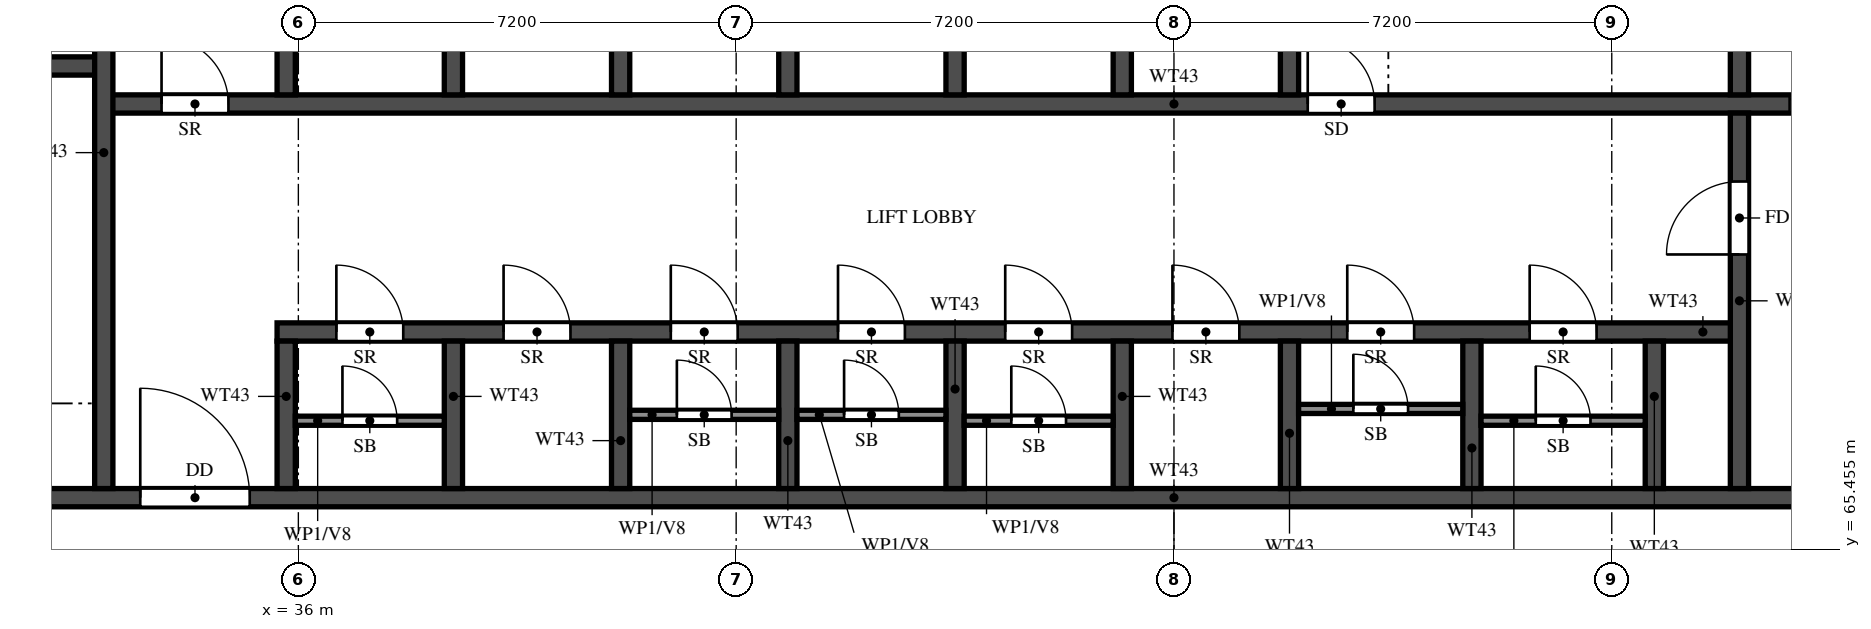
"""IFC4 building model, lengths in metres.
Left out: names, types, materials, properties, quantities, classifications, styles, units other than length and angle.
Written with IfcOpenShell. Run it as: python <this file> out.ifc"""

import sys

from ifc_helpers import new_model, si_unit, direction, frame, frame_2d, origin, place, context, subcontext, project, spatial, rectangle, extrude, element, fill, save


model = new_model("IFC4")
c1 = context("Model", 3, precision=1e-05, world=origin(), true_north=direction((0.0, 1.0)))
c2 = subcontext(c1, "Body", "Model", "MODEL_VIEW")
j1 = project(units=[si_unit("LENGTHUNIT", "METRE"), si_unit("PLANEANGLEUNIT", "RADIAN")], contexts=[c1])
p1 = place(None, origin())
s1 = spatial("IfcSite", under=j1, at=p1, CompositionType="ELEMENT")
p2 = place(p1, origin())
s2 = spatial("IfcBuilding", under=s1, at=p2, CompositionType="ELEMENT")
p3 = place(p2, frame((0.0, 0.0, 274.5)))
s3 = spatial("IfcBuildingStorey", under=s2, at=p3, CompositionType="ELEMENT", Elevation=274.5)
p4 = place(p3, frame((29.2, 66.3, 0.0), z_axis=(0.0, 0.0, 1.0), x_axis=(1.0, 0.0, 0.0)))
e1 = element("IfcWall", 1, at=p4, inside=s3, PredefinedType="SHEAR", context=c2, shape_type="SweptSolid", body=[
    extrude(rectangle(XDim=42.4, YDim=0.3, at=frame_2d((21.2, 0.0))), origin(), (0.0, 0.0, 1.0), 7.0),
])
p5 = place(p4, frame((1.425, 0.0, 0.0)))
e2 = element("IfcOpeningElement", 2, at=p5, cuts=e1, PredefinedType="OPENING", context=c2, shape_type="SweptSolid", body=[
    extrude(rectangle(XDim=1.1, YDim=2.1, at=frame_2d((0.55, 1.05))), frame((0.0, 0.16, 0.0), z_axis=(0.0, -1.0, 0.0), x_axis=(1.0, 0.0, 0.0)), (0.0, 0.0, 1.0), 0.32),
])
p6 = place(p4, frame((4.2, 0.0, 0.0)))
e3 = element("IfcOpeningElement", 3, at=p6, cuts=e1, PredefinedType="OPENING", context=c2, shape_type="SweptSolid", body=[
    extrude(rectangle(XDim=1.8, YDim=2.1, at=frame_2d((0.9, 1.05))), frame((0.0, 0.16, 0.0), z_axis=(0.0, -1.0, 0.0), x_axis=(1.0, 0.0, 0.0)), (0.0, 0.0, 1.0), 0.32),
])
p7 = place(p3, frame((35.65, 69.025, 0.0), z_axis=(0.0, 0.0, 1.0), x_axis=(1.0, 0.0, 0.0)))
e4 = element("IfcWall", 4, at=p7, inside=s3, PredefinedType="SHEAR", context=c2, shape_type="SweptSolid", body=[
    extrude(rectangle(XDim=24.05, YDim=0.3, at=frame_2d((12.025, 0.0))), origin(), (0.0, 0.0, 1.0), 7.0),
])
p8 = place(p7, frame((0.975, 0.0, 0.0)))
e5 = element("IfcOpeningElement", 5, at=p8, cuts=e4, PredefinedType="OPENING", context=c2, shape_type="SweptSolid", body=[
    extrude(rectangle(XDim=1.1, YDim=2.1, at=frame_2d((0.55, 1.05))), frame((0.0, 0.16, 0.0), z_axis=(0.0, -1.0, 0.0), x_axis=(1.0, 0.0, 0.0)), (0.0, 0.0, 1.0), 0.32),
])
p9 = place(p7, frame((3.725, 0.0, 0.0)))
e6 = element("IfcOpeningElement", 6, at=p9, cuts=e4, PredefinedType="OPENING", context=c2, shape_type="SweptSolid", body=[
    extrude(rectangle(XDim=1.1, YDim=2.1, at=frame_2d((0.55, 1.05))), frame((0.0, 0.16, 0.0), z_axis=(0.0, -1.0, 0.0), x_axis=(1.0, 0.0, 0.0)), (0.0, 0.0, 1.0), 0.32),
])
p10 = place(p7, frame((6.475, 0.0, 0.0)))
e7 = element("IfcOpeningElement", 7, at=p10, cuts=e4, PredefinedType="OPENING", context=c2, shape_type="SweptSolid", body=[
    extrude(rectangle(XDim=1.1, YDim=2.1, at=frame_2d((0.55, 1.05))), frame((0.0, 0.16, 0.0), z_axis=(0.0, -1.0, 0.0), x_axis=(1.0, 0.0, 0.0)), (0.0, 0.0, 1.0), 0.32),
])
p11 = place(p7, frame((9.225, 0.0, 0.0)))
e8 = element("IfcOpeningElement", 8, at=p11, cuts=e4, PredefinedType="OPENING", context=c2, shape_type="SweptSolid", body=[
    extrude(rectangle(XDim=1.1, YDim=2.1, at=frame_2d((0.55, 1.05))), frame((0.0, 0.16, 0.0), z_axis=(0.0, -1.0, 0.0), x_axis=(1.0, 0.0, 0.0)), (0.0, 0.0, 1.0), 0.32),
])
p12 = place(p7, frame((11.975, 0.0, 0.0)))
e9 = element("IfcOpeningElement", 9, at=p12, cuts=e4, PredefinedType="OPENING", context=c2, shape_type="SweptSolid", body=[
    extrude(rectangle(XDim=1.1, YDim=2.1, at=frame_2d((0.55, 1.05))), frame((0.0, 0.16, 0.0), z_axis=(0.0, -1.0, 0.0), x_axis=(1.0, 0.0, 0.0)), (0.0, 0.0, 1.0), 0.32),
])
p13 = place(p7, frame((14.725, 0.0, 0.0)))
e10 = element("IfcOpeningElement", 10, at=p13, cuts=e4, PredefinedType="OPENING", context=c2, shape_type="SweptSolid", body=[
    extrude(rectangle(XDim=1.1, YDim=2.1, at=frame_2d((0.55, 1.05))), frame((0.0, 0.16, 0.0), z_axis=(0.0, -1.0, 0.0), x_axis=(1.0, 0.0, 0.0)), (0.0, 0.0, 1.0), 0.32),
])
p14 = place(p7, frame((17.6, 0.0, 0.0)))
e11 = element("IfcOpeningElement", 11, at=p14, cuts=e4, PredefinedType="OPENING", context=c2, shape_type="SweptSolid", body=[
    extrude(rectangle(XDim=1.1, YDim=2.1, at=frame_2d((0.55, 1.05))), frame((0.0, 0.16, 0.0), z_axis=(0.0, -1.0, 0.0), x_axis=(1.0, 0.0, 0.0)), (0.0, 0.0, 1.0), 0.32),
])
p15 = place(p7, frame((20.6, 0.0, 0.0)))
e12 = element("IfcOpeningElement", 12, at=p15, cuts=e4, PredefinedType="OPENING", context=c2, shape_type="SweptSolid", body=[
    extrude(rectangle(XDim=1.1, YDim=2.1, at=frame_2d((0.55, 1.05))), frame((0.0, 0.16, 0.0), z_axis=(0.0, -1.0, 0.0), x_axis=(1.0, 0.0, 0.0)), (0.0, 0.0, 1.0), 0.32),
])
p16 = place(p3, frame((32.8, 72.775, 0.0), z_axis=(0.0, 0.0, 1.0), x_axis=(1.0, 0.0, 0.0)))
e13 = element("IfcWall", 13, at=p16, inside=s3, PredefinedType="SHEAR", context=c2, shape_type="SweptSolid", body=[
    extrude(rectangle(XDim=35.2, YDim=0.3, at=frame_2d((17.6, 0.0))), origin(), (0.0, 0.0, 1.0), 7.0),
])
p17 = place(p16, frame((19.8, 0.0, 0.0)))
e14 = element("IfcOpeningElement", 14, at=p17, cuts=e13, PredefinedType="OPENING", context=c2, shape_type="SweptSolid", body=[
    extrude(rectangle(XDim=1.1, YDim=2.1, at=frame_2d((0.55, 1.05))), frame((0.0, 0.16, 0.0), z_axis=(0.0, -1.0, 0.0), x_axis=(1.0, 0.0, 0.0)), (0.0, 0.0, 1.0), 0.32),
])
p18 = place(p16, frame((27.725, 0.0, 0.0)))
e15 = element("IfcOpeningElement", 15, at=p18, cuts=e13, PredefinedType="OPENING", context=c2, shape_type="SweptSolid", body=[
    extrude(rectangle(XDim=1.1, YDim=2.1, at=frame_2d((0.55, 1.05))), frame((0.0, 0.16, 0.0), z_axis=(0.0, -1.0, 0.0), x_axis=(1.0, 0.0, 0.0)), (0.0, 0.0, 1.0), 0.32),
])
p19 = place(p16, frame((30.325, 0.0, 0.0)))
e16 = element("IfcOpeningElement", 16, at=p19, cuts=e13, PredefinedType="OPENING", context=c2, shape_type="SweptSolid", body=[
    extrude(rectangle(XDim=1.1, YDim=2.1, at=frame_2d((0.55, 1.05))), frame((0.0, 0.16, 0.0), z_axis=(0.0, -1.0, 0.0), x_axis=(1.0, 0.0, 0.0)), (0.0, 0.0, 1.0), 0.32),
])
p20 = place(p16, frame((0.95, 0.0, 0.0)))
e17 = element("IfcOpeningElement", 17, at=p20, cuts=e13, PredefinedType="OPENING", context=c2, shape_type="SweptSolid", body=[
    extrude(rectangle(XDim=1.1, YDim=2.1, at=frame_2d((0.55, 1.05))), frame((0.0, 0.16, 0.0), z_axis=(0.0, -1.0, 0.0), x_axis=(1.0, 0.0, 0.0)), (0.0, 0.0, 1.0), 0.32),
])
p21 = place(p3, frame((29.7, 73.4, 0.0), z_axis=(0.0, 0.0, 1.0), x_axis=(1.0, 0.0, 0.0)))
e18 = element("IfcWall", 18, at=p21, inside=s3, PredefinedType="SHEAR", context=c2, shape_type="SweptSolid", body=[
    extrude(rectangle(XDim=3.1, YDim=0.3, at=frame_2d((1.55, 0.0))), origin(), (0.0, 0.0, 1.0), 7.0),
])
p22 = place(p3, frame((32.8, 66.45, 0.0), z_axis=(0.0, 0.0, 1.0), x_axis=(0.0, 1.0, 0.0)))
e19 = element("IfcWall", 19, at=p22, inside=s3, PredefinedType="SHEAR", context=c2, shape_type="SweptSolid", body=[
    extrude(rectangle(XDim=11.05, YDim=0.3, at=frame_2d((5.525, 0.0))), origin(), (0.0, 0.0, 1.0), 7.0),
])
p23 = place(p3, frame((59.7, 66.45, 0.0), z_axis=(0.0, 0.0, 1.0), x_axis=(0.0, 1.0, 0.0)))
e20 = element("IfcWall", 20, at=p23, inside=s3, PredefinedType="SHEAR", context=c2, shape_type="SweptSolid", body=[
    extrude(rectangle(XDim=6.175, YDim=0.3, at=frame_2d((3.087, 0.0))), origin(), (0.0, 0.0, 1.0), 7.0),
])
p24 = place(p23, frame((3.85, 0.0, 0.0)))
e21 = element("IfcOpeningElement", 21, at=p24, cuts=e20, PredefinedType="OPENING", context=c2, shape_type="SweptSolid", body=[
    extrude(rectangle(XDim=1.2, YDim=2.1, at=frame_2d((0.6, 1.05))), frame((0.0, 0.16, 0.0), z_axis=(0.0, -1.0, 0.0), x_axis=(1.0, 0.0, 0.0)), (0.0, 0.0, 1.0), 0.32),
])
p25 = place(p3, frame((59.7, 72.925, 0.0), z_axis=(0.0, 0.0, 1.0), x_axis=(0.0, 1.0, 0.0)))
e22 = element("IfcWall", 22, at=p25, inside=s3, PredefinedType="SHEAR", context=c2, shape_type="SweptSolid", body=[
    extrude(rectangle(XDim=2.95, YDim=0.3, at=frame_2d((1.475, 0.0))), origin(), (0.0, 0.0, 1.0), 7.0),
])
for number, where, z_axis, x_axis in (
    (23, (35.8, 66.45, 0.0), (0.0, 0.0, 1.0), (0.0, 1.0, 0.0)),
    (24, (38.55, 66.45, 0.0), (0.0, 0.0, 1.0), (0.0, 1.0, 0.0)),
    (25, (41.3, 66.45, 0.0), (0.0, 0.0, 1.0), (0.0, 1.0, 0.0)),
    (26, (44.05, 66.45, 0.0), (0.0, 0.0, 1.0), (0.0, 1.0, 0.0)),
    (27, (46.8, 66.45, 0.0), (0.0, 0.0, 1.0), (0.0, 1.0, 0.0)),
    (28, (49.55, 66.45, 0.0), (0.0, 0.0, 1.0), (0.0, 1.0, 0.0)),
    (29, (52.3, 66.45, 0.0), (0.0, 0.0, 1.0), (0.0, 1.0, 0.0)),
    (30, (55.3, 66.45, 0.0), (0.0, 0.0, 1.0), (0.0, 1.0, 0.0)),
    (31, (58.3, 66.45, 0.0), (0.0, 0.0, 1.0), (0.0, 1.0, 0.0)),
):
    element("IfcWall", number, at=place(p3, frame(where, z_axis=z_axis, x_axis=x_axis)), inside=s3, PredefinedType="SHEAR", context=c2, shape_type="SweptSolid", body=[
        extrude(rectangle(XDim=2.425, YDim=0.3, at=frame_2d((1.212, 0.0))), origin(), (0.0, 0.0, 1.0), 7.0),
    ])
for number, where, z_axis, x_axis in (
    (32, (35.8, 72.925, 0.0), (0.0, 0.0, 1.0), (0.0, 1.0, 0.0)),
    (33, (38.55, 72.925, 0.0), (0.0, 0.0, 1.0), (0.0, 1.0, 0.0)),
    (34, (41.3, 72.925, 0.0), (0.0, 0.0, 1.0), (0.0, 1.0, 0.0)),
    (35, (44.05, 72.925, 0.0), (0.0, 0.0, 1.0), (0.0, 1.0, 0.0)),
    (36, (46.8, 72.925, 0.0), (0.0, 0.0, 1.0), (0.0, 1.0, 0.0)),
    (37, (49.55, 72.925, 0.0), (0.0, 0.0, 1.0), (0.0, 1.0, 0.0)),
    (38, (52.3, 72.925, 0.0), (0.0, 0.0, 1.0), (0.0, 1.0, 0.0)),
):
    element("IfcWall", number, at=place(p3, frame(where, z_axis=z_axis, x_axis=x_axis)), inside=s3, PredefinedType="SHEAR", context=c2, shape_type="SweptSolid", body=[
        extrude(rectangle(XDim=2.95, YDim=0.3, at=frame_2d((1.475, 0.0))), origin(), (0.0, 0.0, 1.0), 7.0),
    ])
p26 = place(p3, frame((35.95, 67.565, 0.0), z_axis=(0.0, 0.0, 1.0), x_axis=(1.0, 0.0, 0.0)))
e39 = element("IfcWall", 39, at=p26, inside=s3, PredefinedType="PARTITIONING", context=c2, shape_type="SweptSolid", body=[
    extrude(rectangle(XDim=2.45, YDim=0.15, at=frame_2d((1.225, 0.0))), origin(), (0.0, 0.0, 1.0), 7.0),
])
p27 = place(p26, frame((0.775, 0.0, 0.0)))
e40 = element("IfcOpeningElement", 40, at=p27, cuts=e39, PredefinedType="OPENING", context=c2, shape_type="SweptSolid", body=[
    extrude(rectangle(XDim=0.9, YDim=2.1, at=frame_2d((0.45, 1.05))), frame((0.0, 0.085, 0.0), z_axis=(0.0, -1.0, 0.0), x_axis=(1.0, 0.0, 0.0)), (0.0, 0.0, 1.0), 0.17),
])
p28 = place(p3, frame((41.45, 67.663, 0.0), z_axis=(0.0, 0.0, 1.0), x_axis=(1.0, 0.0, 0.0)))
e41 = element("IfcWall", 41, at=p28, inside=s3, PredefinedType="PARTITIONING", context=c2, shape_type="SweptSolid", body=[
    extrude(rectangle(XDim=2.45, YDim=0.15, at=frame_2d((1.225, 0.0))), origin(), (0.0, 0.0, 1.0), 7.0),
])
p29 = place(p28, frame((0.775, 0.0, 0.0)))
e42 = element("IfcOpeningElement", 42, at=p29, cuts=e41, PredefinedType="OPENING", context=c2, shape_type="SweptSolid", body=[
    extrude(rectangle(XDim=0.9, YDim=2.1, at=frame_2d((0.45, 1.05))), frame((0.0, 0.085, 0.0), z_axis=(0.0, -1.0, 0.0), x_axis=(1.0, 0.0, 0.0)), (0.0, 0.0, 1.0), 0.17),
])
p30 = place(p3, frame((44.2, 67.663, 0.0), z_axis=(0.0, 0.0, 1.0), x_axis=(1.0, 0.0, 0.0)))
e43 = element("IfcWall", 43, at=p30, inside=s3, PredefinedType="PARTITIONING", context=c2, shape_type="SweptSolid", body=[
    extrude(rectangle(XDim=2.45, YDim=0.15, at=frame_2d((1.225, 0.0))), origin(), (0.0, 0.0, 1.0), 7.0),
])
p31 = place(p30, frame((0.775, 0.0, 0.0)))
e44 = element("IfcOpeningElement", 44, at=p31, cuts=e43, PredefinedType="OPENING", context=c2, shape_type="SweptSolid", body=[
    extrude(rectangle(XDim=0.9, YDim=2.1, at=frame_2d((0.45, 1.05))), frame((0.0, 0.085, 0.0), z_axis=(0.0, -1.0, 0.0), x_axis=(1.0, 0.0, 0.0)), (0.0, 0.0, 1.0), 0.17),
])
p32 = place(p3, frame((46.95, 67.565, 0.0), z_axis=(0.0, 0.0, 1.0), x_axis=(1.0, 0.0, 0.0)))
e45 = element("IfcWall", 45, at=p32, inside=s3, PredefinedType="PARTITIONING", context=c2, shape_type="SweptSolid", body=[
    extrude(rectangle(XDim=2.45, YDim=0.15, at=frame_2d((1.225, 0.0))), origin(), (0.0, 0.0, 1.0), 7.0),
])
p33 = place(p32, frame((0.775, 0.0, 0.0)))
e46 = element("IfcOpeningElement", 46, at=p33, cuts=e45, PredefinedType="OPENING", context=c2, shape_type="SweptSolid", body=[
    extrude(rectangle(XDim=0.9, YDim=2.1, at=frame_2d((0.45, 1.05))), frame((0.0, 0.085, 0.0), z_axis=(0.0, -1.0, 0.0), x_axis=(1.0, 0.0, 0.0)), (0.0, 0.0, 1.0), 0.17),
])
p34 = place(p3, frame((52.45, 67.76, 0.0), z_axis=(0.0, 0.0, 1.0), x_axis=(1.0, 0.0, 0.0)))
e47 = element("IfcWall", 47, at=p34, inside=s3, PredefinedType="PARTITIONING", context=c2, shape_type="SweptSolid", body=[
    extrude(rectangle(XDim=2.7, YDim=0.15, at=frame_2d((1.35, 0.0))), origin(), (0.0, 0.0, 1.0), 7.0),
])
p35 = place(p34, frame((0.9, 0.0, 0.0)))
e48 = element("IfcOpeningElement", 48, at=p35, cuts=e47, PredefinedType="OPENING", context=c2, shape_type="SweptSolid", body=[
    extrude(rectangle(XDim=0.9, YDim=2.1, at=frame_2d((0.45, 1.05))), frame((0.0, 0.085, 0.0), z_axis=(0.0, -1.0, 0.0), x_axis=(1.0, 0.0, 0.0)), (0.0, 0.0, 1.0), 0.17),
])
p36 = place(p3, frame((55.45, 67.565, 0.0), z_axis=(0.0, 0.0, 1.0), x_axis=(1.0, 0.0, 0.0)))
e49 = element("IfcWall", 49, at=p36, inside=s3, PredefinedType="PARTITIONING", context=c2, shape_type="SweptSolid", body=[
    extrude(rectangle(XDim=2.7, YDim=0.15, at=frame_2d((1.35, 0.0))), origin(), (0.0, 0.0, 1.0), 7.0),
])
p37 = place(p36, frame((0.9, 0.0, 0.0)))
e50 = element("IfcOpeningElement", 50, at=p37, cuts=e49, PredefinedType="OPENING", context=c2, shape_type="SweptSolid", body=[
    extrude(rectangle(XDim=0.9, YDim=2.1, at=frame_2d((0.45, 1.05))), frame((0.0, 0.085, 0.0), z_axis=(0.0, -1.0, 0.0), x_axis=(1.0, 0.0, 0.0)), (0.0, 0.0, 1.0), 0.17),
])
p38 = place(p17, origin())
e51 = element("IfcDoor", 51, at=p38, inside=s3, OperationType="SINGLE_SWING_LEFT", PredefinedType="DOOR", context=c2, shape_type="SweptSolid", body=[
    extrude(rectangle(XDim=1.1, YDim=2.1, at=frame_2d((0.55, 1.05))), frame((0.0, 0.025, 0.0), z_axis=(0.0, -1.0, 0.0), x_axis=(1.0, 0.0, 0.0)), (0.0, 0.0, 1.0), 0.05),
])
fill(e14, e51)
p39 = place(p6, origin())
e52 = element("IfcDoor", 52, at=p39, inside=s3, OperationType="DOUBLE_DOOR_SINGLE_SWING", PredefinedType="DOOR", context=c2, shape_type="SweptSolid", body=[
    extrude(rectangle(XDim=1.8, YDim=2.1, at=frame_2d((0.9, 1.05))), frame((0.0, 0.025, 0.0), z_axis=(0.0, -1.0, 0.0), x_axis=(1.0, 0.0, 0.0)), (0.0, 0.0, 1.0), 0.05),
])
fill(e3, e52)
p40 = place(p24, origin())
e53 = element("IfcDoor", 53, at=p40, inside=s3, OperationType="SINGLE_SWING_LEFT", PredefinedType="DOOR", context=c2, shape_type="SweptSolid", body=[
    extrude(rectangle(XDim=1.2, YDim=2.1, at=frame_2d((0.6, 1.05))), frame((0.0, 0.025, 0.0), z_axis=(0.0, -1.0, 0.0), x_axis=(1.0, 0.0, 0.0)), (0.0, 0.0, 1.0), 0.05),
])
fill(e21, e53)
p41 = place(p18, origin())
e54 = element("IfcDoor", 54, at=p41, inside=s3, OperationType="SLIDING_TO_LEFT", PredefinedType="DOOR", context=c2, shape_type="SweptSolid", body=[
    extrude(rectangle(XDim=1.1, YDim=2.1, at=frame_2d((0.55, 1.05))), frame((0.0, 0.025, 0.0), z_axis=(0.0, -1.0, 0.0), x_axis=(1.0, 0.0, 0.0)), (0.0, 0.0, 1.0), 0.05),
])
fill(e15, e54)
p42 = place(p8, origin())
e55 = element("IfcDoor", 55, at=p42, inside=s3, OperationType="SINGLE_SWING_RIGHT", PredefinedType="DOOR", context=c2, shape_type="SweptSolid", body=[
    extrude(rectangle(XDim=1.1, YDim=2.1, at=frame_2d((0.55, 1.05))), frame((0.0, 0.025, 0.0), z_axis=(0.0, -1.0, 0.0), x_axis=(1.0, 0.0, 0.0)), (0.0, 0.0, 1.0), 0.05),
])
fill(e5, e55)
p43 = place(p27, origin())
e56 = element("IfcDoor", 56, at=p43, inside=s3, OperationType="SINGLE_SWING_RIGHT", PredefinedType="DOOR", context=c2, shape_type="SweptSolid", body=[
    extrude(rectangle(XDim=0.9, YDim=2.1, at=frame_2d((0.45, 1.05))), frame((0.0, 0.025, 0.0), z_axis=(0.0, -1.0, 0.0), x_axis=(1.0, 0.0, 0.0)), (0.0, 0.0, 1.0), 0.05),
])
fill(e40, e56)
p44 = place(p9, origin())
e57 = element("IfcDoor", 57, at=p44, inside=s3, OperationType="SINGLE_SWING_LEFT", PredefinedType="DOOR", context=c2, shape_type="SweptSolid", body=[
    extrude(rectangle(XDim=1.1, YDim=2.1, at=frame_2d((0.55, 1.05))), frame((0.0, 0.025, 0.0), z_axis=(0.0, -1.0, 0.0), x_axis=(1.0, 0.0, 0.0)), (0.0, 0.0, 1.0), 0.05),
])
fill(e6, e57)
p45 = place(p10, origin())
e58 = element("IfcDoor", 58, at=p45, inside=s3, OperationType="SINGLE_SWING_RIGHT", PredefinedType="DOOR", context=c2, shape_type="SweptSolid", body=[
    extrude(rectangle(XDim=1.1, YDim=2.1, at=frame_2d((0.55, 1.05))), frame((0.0, 0.025, 0.0), z_axis=(0.0, -1.0, 0.0), x_axis=(1.0, 0.0, 0.0)), (0.0, 0.0, 1.0), 0.05),
])
fill(e7, e58)
p46 = place(p29, origin())
e59 = element("IfcDoor", 59, at=p46, inside=s3, OperationType="SINGLE_SWING_RIGHT", PredefinedType="DOOR", context=c2, shape_type="SweptSolid", body=[
    extrude(rectangle(XDim=0.9, YDim=2.1, at=frame_2d((0.45, 1.05))), frame((0.0, 0.025, 0.0), z_axis=(0.0, -1.0, 0.0), x_axis=(1.0, 0.0, 0.0)), (0.0, 0.0, 1.0), 0.05),
])
fill(e42, e59)
p47 = place(p11, origin())
e60 = element("IfcDoor", 60, at=p47, inside=s3, OperationType="SINGLE_SWING_LEFT", PredefinedType="DOOR", context=c2, shape_type="SweptSolid", body=[
    extrude(rectangle(XDim=1.1, YDim=2.1, at=frame_2d((0.55, 1.05))), frame((0.0, 0.025, 0.0), z_axis=(0.0, -1.0, 0.0), x_axis=(1.0, 0.0, 0.0)), (0.0, 0.0, 1.0), 0.05),
])
fill(e8, e60)
p48 = place(p31, origin())
e61 = element("IfcDoor", 61, at=p48, inside=s3, OperationType="SINGLE_SWING_LEFT", PredefinedType="DOOR", context=c2, shape_type="SweptSolid", body=[
    extrude(rectangle(XDim=0.9, YDim=2.1, at=frame_2d((0.45, 1.05))), frame((0.0, 0.025, 0.0), z_axis=(0.0, -1.0, 0.0), x_axis=(1.0, 0.0, 0.0)), (0.0, 0.0, 1.0), 0.05),
])
fill(e44, e61)
p49 = place(p12, origin())
e62 = element("IfcDoor", 62, at=p49, inside=s3, OperationType="SINGLE_SWING_RIGHT", PredefinedType="DOOR", context=c2, shape_type="SweptSolid", body=[
    extrude(rectangle(XDim=1.1, YDim=2.1, at=frame_2d((0.55, 1.05))), frame((0.0, 0.025, 0.0), z_axis=(0.0, -1.0, 0.0), x_axis=(1.0, 0.0, 0.0)), (0.0, 0.0, 1.0), 0.05),
])
fill(e9, e62)
p50 = place(p33, origin())
e63 = element("IfcDoor", 63, at=p50, inside=s3, OperationType="SINGLE_SWING_RIGHT", PredefinedType="DOOR", context=c2, shape_type="SweptSolid", body=[
    extrude(rectangle(XDim=0.9, YDim=2.1, at=frame_2d((0.45, 1.05))), frame((0.0, 0.025, 0.0), z_axis=(0.0, -1.0, 0.0), x_axis=(1.0, 0.0, 0.0)), (0.0, 0.0, 1.0), 0.05),
])
fill(e46, e63)
p51 = place(p13, origin())
e64 = element("IfcDoor", 64, at=p51, inside=s3, OperationType="SINGLE_SWING_LEFT", PredefinedType="DOOR", context=c2, shape_type="SweptSolid", body=[
    extrude(rectangle(XDim=1.1, YDim=2.1, at=frame_2d((0.55, 1.05))), frame((0.0, 0.025, 0.0), z_axis=(0.0, -1.0, 0.0), x_axis=(1.0, 0.0, 0.0)), (0.0, 0.0, 1.0), 0.05),
])
fill(e10, e64)
p52 = place(p14, origin())
e65 = element("IfcDoor", 65, at=p52, inside=s3, OperationType="SINGLE_SWING_RIGHT", PredefinedType="DOOR", context=c2, shape_type="SweptSolid", body=[
    extrude(rectangle(XDim=1.1, YDim=2.1, at=frame_2d((0.55, 1.05))), frame((0.0, 0.025, 0.0), z_axis=(0.0, -1.0, 0.0), x_axis=(1.0, 0.0, 0.0)), (0.0, 0.0, 1.0), 0.05),
])
fill(e11, e65)
p53 = place(p35, origin())
e66 = element("IfcDoor", 66, at=p53, inside=s3, OperationType="SINGLE_SWING_LEFT", PredefinedType="DOOR", context=c2, shape_type="SweptSolid", body=[
    extrude(rectangle(XDim=0.9, YDim=2.1, at=frame_2d((0.45, 1.05))), frame((0.0, 0.025, 0.0), z_axis=(0.0, -1.0, 0.0), x_axis=(1.0, 0.0, 0.0)), (0.0, 0.0, 1.0), 0.05),
])
fill(e48, e66)
p54 = place(p15, origin())
e67 = element("IfcDoor", 67, at=p54, inside=s3, OperationType="SINGLE_SWING_RIGHT", PredefinedType="DOOR", context=c2, shape_type="SweptSolid", body=[
    extrude(rectangle(XDim=1.1, YDim=2.1, at=frame_2d((0.55, 1.05))), frame((0.0, 0.025, 0.0), z_axis=(0.0, -1.0, 0.0), x_axis=(1.0, 0.0, 0.0)), (0.0, 0.0, 1.0), 0.05),
])
fill(e12, e67)
p55 = place(p37, origin())
e68 = element("IfcDoor", 68, at=p55, inside=s3, OperationType="SINGLE_SWING_RIGHT", PredefinedType="DOOR", context=c2, shape_type="SweptSolid", body=[
    extrude(rectangle(XDim=0.9, YDim=2.1, at=frame_2d((0.45, 1.05))), frame((0.0, 0.025, 0.0), z_axis=(0.0, -1.0, 0.0), x_axis=(1.0, 0.0, 0.0)), (0.0, 0.0, 1.0), 0.05),
])
fill(e50, e68)
p56 = place(p20, origin())
e69 = element("IfcDoor", 69, at=p56, inside=s3, OperationType="SINGLE_SWING_LEFT", PredefinedType="DOOR", context=c2, shape_type="SweptSolid", body=[
    extrude(rectangle(XDim=1.1, YDim=2.1, at=frame_2d((0.55, 1.05))), frame((0.0, 0.025, 0.0), z_axis=(0.0, -1.0, 0.0), x_axis=(1.0, 0.0, 0.0)), (0.0, 0.0, 1.0), 0.05),
])
fill(e17, e69)
save(model, sys.argv[1])
